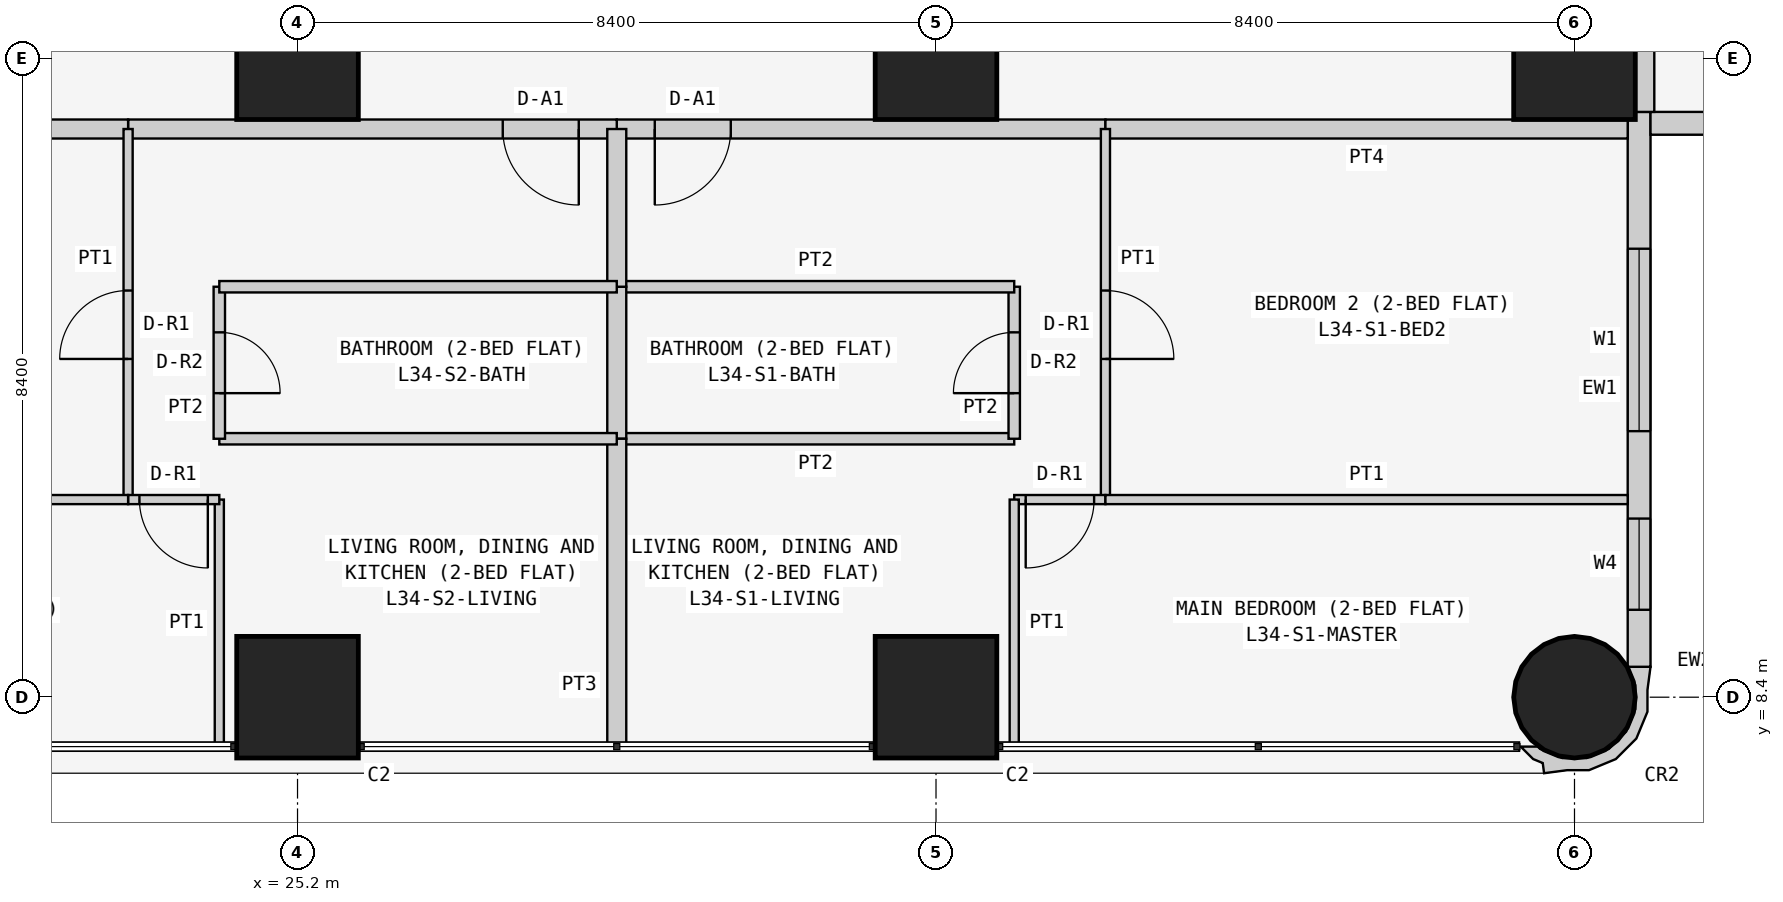
"""IFC4 building model, lengths in metres.
Left out: names, types, materials, properties, quantities, classifications, styles, units other than length and angle.
Written with IfcOpenShell. Run it as: python <this file> out.ifc"""

import sys

from ifc_helpers import new_model, si_unit, direction, frame, frame_2d, origin, origin_2d, place, context, subcontext, project, spatial, polyline, rectangle, circle, outline, extrude, element, fill, save


model = new_model("IFC4")
c1 = context("Model", 3, precision=1e-05, world=origin(), true_north=direction((0.0, 1.0)))
c2 = subcontext(c1, "Body", "Model", "MODEL_VIEW")
j1 = project(units=[si_unit("LENGTHUNIT", "METRE"), si_unit("PLANEANGLEUNIT", "RADIAN")], contexts=[c1])
p1 = place(None, origin())
s1 = spatial("IfcSite", under=j1, at=p1, CompositionType="ELEMENT")
p2 = place(p1, origin())
s2 = spatial("IfcBuilding", under=s1, at=p2, CompositionType="ELEMENT")
p3 = place(p2, frame((0.0, 0.0, 134.1)))
s3 = spatial("IfcBuildingStorey", under=s2, at=p3, CompositionType="ELEMENT", Elevation=134.1)
for number, where, z_axis, x_axis in (
    (1, (25.2, 8.4, 0.0), (0.0, 0.0, 1.0), (1.0, 0.0, 0.0)),
    (2, (25.2, 16.8, 0.0), (0.0, 0.0, 1.0), (1.0, 0.0, 0.0)),
    (3, (33.6, 8.4, 0.0), (0.0, 0.0, 1.0), (1.0, 0.0, 0.0)),
    (4, (33.6, 16.8, 0.0), (0.0, 0.0, 1.0), (1.0, 0.0, 0.0)),
):
    element("IfcColumn", number, at=place(p3, frame(where, z_axis=z_axis, x_axis=x_axis)), inside=s3, PredefinedType="COLUMN", context=c2, shape_type="SweptSolid", body=[
        extrude(rectangle(XDim=1.6, YDim=1.6, at=origin_2d()), origin(), (0.0, 0.0, 1.0), 3.6),
    ])
p4 = place(p3, frame((42.0, 8.4, 0.0), z_axis=(0.0, 0.0, 1.0), x_axis=(1.0, 0.0, 0.0)))
e5 = element("IfcColumn", 5, at=p4, inside=s3, PredefinedType="COLUMN", context=c2, shape_type="SweptSolid", body=[
    extrude(circle(Radius=0.8, at=origin_2d()), origin(), (0.0, 0.0, 1.0), 3.6),
])
p5 = place(p3, frame((42.0, 16.8, 0.0), z_axis=(0.0, 0.0, 1.0), x_axis=(1.0, 0.0, 0.0)))
e6 = element("IfcColumn", 6, at=p5, inside=s3, PredefinedType="COLUMN", context=c2, shape_type="SweptSolid", body=[
    extrude(rectangle(XDim=1.6, YDim=1.6, at=origin_2d()), origin(), (0.0, 0.0, 1.0), 3.6),
])
p6 = place(p3, frame((42.85, 8.8, 0.0), z_axis=(0.0, 0.0, 1.0), x_axis=(0.0, 1.0, 0.0)))
e7 = element("IfcWall", 7, at=p6, inside=s3, PredefinedType="SOLIDWALL", context=c2, shape_type="SweptSolid", body=[
    extrude(rectangle(XDim=7.3, YDim=0.3, at=frame_2d((3.65, 0.0))), origin(), (0.0, 0.0, 1.0), 3.45),
])
p7 = place(p6, frame((3.1, 0.0, 0.9)))
e8 = element("IfcOpeningElement", 8, at=p7, cuts=e7, PredefinedType="OPENING", context=c2, shape_type="SweptSolid", body=[
    extrude(rectangle(XDim=2.4, YDim=1.5, at=frame_2d((1.2, 0.75))), frame((0.0, 0.16, 0.0), z_axis=(0.0, -1.0, 0.0), x_axis=(1.0, 0.0, 0.0)), (0.0, 0.0, 1.0), 0.32),
])
p8 = place(p6, frame((0.75, 0.0, 0.9)))
e9 = element("IfcOpeningElement", 9, at=p8, cuts=e7, PredefinedType="OPENING", context=c2, shape_type="SweptSolid", body=[
    extrude(rectangle(XDim=1.2, YDim=1.5, at=frame_2d((0.6, 0.75))), frame((0.0, 0.16, 0.0), z_axis=(0.0, -1.0, 0.0), x_axis=(1.0, 0.0, 0.0)), (0.0, 0.0, 1.0), 0.32),
])
p9 = place(p3, frame((43.0, 15.95, 0.0), z_axis=(0.0, 0.0, 1.0), x_axis=(1.0, 0.0, 0.0)))
e10 = element("IfcWall", 10, at=p9, inside=s3, PredefinedType="SOLIDWALL", context=c2, shape_type="SweptSolid", body=[
    extrude(rectangle(XDim=15.4, YDim=0.3, at=frame_2d((7.7, 0.0))), origin(), (0.0, 0.0, 1.0), 3.45),
])
p10 = place(p9, frame((1.2, 0.0, 0.9)))
e11 = element("IfcOpeningElement", 11, at=p10, cuts=e10, PredefinedType="OPENING", context=c2, shape_type="SweptSolid", body=[
    extrude(rectangle(XDim=1.8, YDim=1.5, at=frame_2d((0.9, 0.75))), frame((0.0, 0.16, 0.0), z_axis=(0.0, -1.0, 0.0), x_axis=(1.0, 0.0, 0.0)), (0.0, 0.0, 1.0), 0.32),
])
p11 = place(p9, frame((4.95, 0.0, 1.5)))
e12 = element("IfcOpeningElement", 12, at=p11, cuts=e10, PredefinedType="OPENING", context=c2, shape_type="SweptSolid", body=[
    extrude(rectangle(XDim=0.9, YDim=0.7, at=frame_2d((0.45, 0.35))), frame((0.0, 0.16, 0.0), z_axis=(0.0, -1.0, 0.0), x_axis=(1.0, 0.0, 0.0)), (0.0, 0.0, 1.0), 0.32),
])
p12 = place(p9, frame((8.5, 0.0, 0.9)))
e13 = element("IfcOpeningElement", 13, at=p12, cuts=e10, PredefinedType="OPENING", context=c2, shape_type="SweptSolid", body=[
    extrude(rectangle(XDim=1.8, YDim=1.5, at=frame_2d((0.9, 0.75))), frame((0.0, 0.16, 0.0), z_axis=(0.0, -1.0, 0.0), x_axis=(1.0, 0.0, 0.0)), (0.0, 0.0, 1.0), 0.32),
])
p13 = place(p9, frame((12.5, 0.0, 0.0)))
e14 = element("IfcOpeningElement", 14, at=p13, cuts=e10, PredefinedType="OPENING", context=c2, shape_type="SweptSolid", body=[
    extrude(rectangle(XDim=0.9, YDim=2.4, at=frame_2d((0.45, 1.2))), frame((0.0, 0.16, 0.0), z_axis=(0.0, -1.0, 0.0), x_axis=(1.0, 0.0, 0.0)), (0.0, 0.0, 1.0), 0.32),
])
p14 = place(p9, frame((13.5, 0.0, 0.9)))
e15 = element("IfcOpeningElement", 15, at=p14, cuts=e10, PredefinedType="OPENING", context=c2, shape_type="SweptSolid", body=[
    extrude(rectangle(XDim=1.2, YDim=1.5, at=frame_2d((0.6, 0.75))), frame((0.0, 0.16, 0.0), z_axis=(0.0, -1.0, 0.0), x_axis=(1.0, 0.0, 0.0)), (0.0, 0.0, 1.0), 0.32),
])
p15 = place(p3, frame((41.352, 7.805, 0.0), z_axis=(0.0, 0.0, 1.0), x_axis=(0.343276641956, -0.93923434088, 0.0)))
e16 = element("IfcWall", 16, at=p15, inside=s3, PredefinedType="SOLIDWALL", context=c2, shape_type="SweptSolid", body=[
    extrude(outline(polyline([(-0.369, 1.89), (-0.509, 1.621), (-0.49, 1.615), (-0.479, 1.609), (-0.211, 1.62), (0.088, 1.511), (0.323, 1.295), (0.457, 1.006), (0.47, 0.688), (0.361, 0.389), (0.145, 0.154), (0.108, 0.136), (0.031, -0.075), (0.241, 0.023), (0.333, 0.124), (0.465, 0.094), (0.532, 0.393), (0.631, 0.663), (0.614, 1.044), (0.453, 1.391), (0.172, 1.649), (-0.097, 1.748), (-0.369, 1.89)])), origin(), (0.0, 0.0, 1.0), 3.45),
])
p16 = place(p3, frame((42.925, 22.971, 0.0), z_axis=(0.0, 0.0, 1.0), x_axis=(0.0, -1.0, 0.0)))
e17 = element("IfcWall", 17, at=p16, inside=s3, PredefinedType="PARTITIONING", context=c2, shape_type="SweptSolid", body=[
    extrude(rectangle(XDim=6.871, YDim=0.25, at=frame_2d((3.436, 0.0))), origin(), (0.0, 0.0, 1.0), 3.45),
])
p17 = place(p3, frame((35.829, 15.875, 0.0), z_axis=(0.0, 0.0, 1.0), x_axis=(-1.0, 0.0, 0.0)))
e18 = element("IfcWall", 18, at=p17, inside=s3, PredefinedType="PARTITIONING", context=c2, shape_type="SweptSolid", body=[
    extrude(rectangle(XDim=6.429, YDim=0.25, at=frame_2d((3.215, 0.0))), origin(), (0.0, 0.0, 1.0), 3.45),
])
p18 = place(p17, frame((4.929, 0.0, 0.0)))
e19 = element("IfcOpeningElement", 19, at=p18, cuts=e18, PredefinedType="OPENING", context=c2, shape_type="SweptSolid", body=[
    extrude(rectangle(XDim=1.0, YDim=2.1, at=frame_2d((0.5, 1.05))), frame((0.0, 0.135, 0.0), z_axis=(0.0, -1.0, 0.0), x_axis=(1.0, 0.0, 0.0)), (0.0, 0.0, 1.0), 0.27),
])
p19 = place(p3, frame((42.7, 15.875, 0.0), z_axis=(0.0, 0.0, 1.0), x_axis=(-1.0, 0.0, 0.0)))
e20 = element("IfcWall", 20, at=p19, inside=s3, PredefinedType="PARTITIONING", context=c2, shape_type="SweptSolid", body=[
    extrude(rectangle(XDim=6.871, YDim=0.25, at=frame_2d((3.436, 0.0))), origin(), (0.0, 0.0, 1.0), 3.45),
])
p20 = place(p3, frame((29.4, 15.875, 0.0), z_axis=(0.0, 0.0, 1.0), x_axis=(-1.0, 0.0, 0.0)))
e21 = element("IfcWall", 21, at=p20, inside=s3, PredefinedType="PARTITIONING", context=c2, shape_type="SweptSolid", body=[
    extrude(rectangle(XDim=6.429, YDim=0.25, at=frame_2d((3.214, 0.0))), origin(), (0.0, 0.0, 1.0), 3.45),
])
p21 = place(p20, frame((0.5, 0.0, 0.0)))
e22 = element("IfcOpeningElement", 22, at=p21, cuts=e21, PredefinedType="OPENING", context=c2, shape_type="SweptSolid", body=[
    extrude(rectangle(XDim=1.0, YDim=2.1, at=frame_2d((0.5, 1.05))), frame((0.0, 0.135, 0.0), z_axis=(0.0, -1.0, 0.0), x_axis=(1.0, 0.0, 0.0)), (0.0, 0.0, 1.0), 0.27),
])
p22 = place(p3, frame((22.971, 15.875, 0.0), z_axis=(0.0, 0.0, 1.0), x_axis=(-1.0, 0.0, 0.0)))
e23 = element("IfcWall", 23, at=p22, inside=s3, PredefinedType="PARTITIONING", context=c2, shape_type="SweptSolid", body=[
    extrude(rectangle(XDim=6.871, YDim=0.25, at=frame_2d((3.436, 0.0))), origin(), (0.0, 0.0, 1.0), 3.45),
])
p23 = place(p3, frame((29.4, 11.8, 0.0), z_axis=(0.0, 0.0, 1.0), x_axis=(1.0, 0.0, 0.0)))
e24 = element("IfcWall", 24, at=p23, inside=s3, PredefinedType="PARTITIONING", context=c2, shape_type="SweptSolid", body=[
    extrude(rectangle(XDim=5.229, YDim=0.15, at=frame_2d((2.615, 0.0))), origin(), (0.0, 0.0, 1.0), 3.45),
])
p24 = place(p3, frame((34.629, 11.8, 0.0), z_axis=(0.0, 0.0, 1.0), x_axis=(0.0, 1.0, 0.0)))
e25 = element("IfcWall", 25, at=p24, inside=s3, PredefinedType="PARTITIONING", context=c2, shape_type="SweptSolid", body=[
    extrude(rectangle(XDim=2.0, YDim=0.15, at=frame_2d((1.0, 0.0))), origin(), (0.0, 0.0, 1.0), 3.45),
])
p25 = place(p24, frame((0.6, 0.0, 0.0)))
e26 = element("IfcOpeningElement", 26, at=p25, cuts=e25, PredefinedType="OPENING", context=c2, shape_type="SweptSolid", body=[
    extrude(rectangle(XDim=0.8, YDim=2.1, at=frame_2d((0.4, 1.05))), frame((0.0, 0.085, 0.0), z_axis=(0.0, -1.0, 0.0), x_axis=(1.0, 0.0, 0.0)), (0.0, 0.0, 1.0), 0.17),
])
p26 = place(p3, frame((34.629, 13.8, 0.0), z_axis=(0.0, 0.0, 1.0), x_axis=(-1.0, 0.0, 0.0)))
e27 = element("IfcWall", 27, at=p26, inside=s3, PredefinedType="PARTITIONING", context=c2, shape_type="SweptSolid", body=[
    extrude(rectangle(XDim=5.229, YDim=0.15, at=frame_2d((2.615, 0.0))), origin(), (0.0, 0.0, 1.0), 3.45),
])
p27 = place(p3, frame((29.4, 13.8, 0.0), z_axis=(0.0, 0.0, 1.0), x_axis=(0.0, -1.0, 0.0)))
e28 = element("IfcWall", 28, at=p27, inside=s3, PredefinedType="PARTITIONING", context=c2, shape_type="SweptSolid", body=[
    extrude(rectangle(XDim=2.0, YDim=0.25, at=frame_2d((1.0, 0.0))), origin(), (0.0, 0.0, 1.0), 2.848),
])
p28 = place(p3, frame((35.829, 15.875, 0.0), z_axis=(0.0, 0.0, 1.0), x_axis=(0.0, -1.0, 0.0)))
e29 = element("IfcWall", 29, at=p28, inside=s3, PredefinedType="PARTITIONING", context=c2, shape_type="SweptSolid", body=[
    extrude(rectangle(XDim=4.875, YDim=0.12, at=frame_2d((2.438, 0.0))), origin(), (0.0, 0.0, 1.0), 3.45),
])
p29 = place(p28, frame((2.125, 0.0, 0.0)))
e30 = element("IfcOpeningElement", 30, at=p29, cuts=e29, PredefinedType="OPENING", context=c2, shape_type="SweptSolid", body=[
    extrude(rectangle(XDim=0.9, YDim=2.1, at=frame_2d((0.45, 1.05))), frame((0.0, 0.07, 0.0), z_axis=(0.0, -1.0, 0.0), x_axis=(1.0, 0.0, 0.0)), (0.0, 0.0, 1.0), 0.14),
])
p30 = place(p3, frame((35.829, 11.0, 0.0), z_axis=(0.0, 0.0, 1.0), x_axis=(-1.0, 0.0, 0.0)))
e31 = element("IfcWall", 31, at=p30, inside=s3, PredefinedType="PARTITIONING", context=c2, shape_type="SweptSolid", body=[
    extrude(rectangle(XDim=1.2, YDim=0.12, at=frame_2d((0.6, 0.0))), origin(), (0.0, 0.0, 1.0), 3.45),
])
p31 = place(p30, frame((0.149, 0.0, 0.0)))
e32 = element("IfcOpeningElement", 32, at=p31, cuts=e31, PredefinedType="OPENING", context=c2, shape_type="SweptSolid", body=[
    extrude(rectangle(XDim=0.9, YDim=2.1, at=frame_2d((0.45, 1.05))), frame((0.0, 0.07, 0.0), z_axis=(0.0, -1.0, 0.0), x_axis=(1.0, 0.0, 0.0)), (0.0, 0.0, 1.0), 0.14),
])
p32 = place(p3, frame((34.629, 11.0, 0.0), z_axis=(0.0, 0.0, 1.0), x_axis=(0.0, -1.0, 0.0)))
e33 = element("IfcWall", 33, at=p32, inside=s3, PredefinedType="PARTITIONING", context=c2, shape_type="SweptSolid", body=[
    extrude(rectangle(XDim=3.25, YDim=0.12, at=frame_2d((1.625, 0.0))), origin(), (0.0, 0.0, 1.0), 3.45),
])
p33 = place(p3, frame((29.4, 7.75, 0.0), z_axis=(0.0, 0.0, 1.0), x_axis=(0.0, 1.0, 0.0)))
e34 = element("IfcWall", 34, at=p33, inside=s3, PredefinedType="PARTITIONING", context=c2, shape_type="SweptSolid", body=[
    extrude(rectangle(XDim=4.05, YDim=0.25, at=frame_2d((2.025, 0.0))), origin(), (0.0, 0.0, 1.0), 2.848),
])
p34 = place(p3, frame((29.4, 13.8, 0.0), z_axis=(0.0, 0.0, 1.0), x_axis=(0.0, 1.0, 0.0)))
e35 = element("IfcWall", 35, at=p34, inside=s3, PredefinedType="PARTITIONING", context=c2, shape_type="SweptSolid", body=[
    extrude(rectangle(XDim=2.075, YDim=0.25, at=frame_2d((1.038, 0.0))), origin(), (0.0, 0.0, 1.0), 2.848),
])
p35 = place(p3, frame((35.829, 11.0, 0.0), z_axis=(0.0, 0.0, 1.0), x_axis=(1.0, 0.0, 0.0)))
e36 = element("IfcWall", 36, at=p35, inside=s3, PredefinedType="PARTITIONING", context=c2, shape_type="SweptSolid", body=[
    extrude(rectangle(XDim=6.871, YDim=0.12, at=frame_2d((3.436, 0.0))), origin(), (0.0, 0.0, 1.0), 3.45),
])
p36 = place(p3, frame((29.4, 11.8, 0.0), z_axis=(0.0, 0.0, 1.0), x_axis=(-1.0, 0.0, 0.0)))
e37 = element("IfcWall", 37, at=p36, inside=s3, PredefinedType="PARTITIONING", context=c2, shape_type="SweptSolid", body=[
    extrude(rectangle(XDim=5.229, YDim=0.15, at=frame_2d((2.615, 0.0))), origin(), (0.0, 0.0, 1.0), 3.45),
])
p37 = place(p3, frame((24.171, 11.8, 0.0), z_axis=(0.0, 0.0, 1.0), x_axis=(0.0, 1.0, 0.0)))
e38 = element("IfcWall", 38, at=p37, inside=s3, PredefinedType="PARTITIONING", context=c2, shape_type="SweptSolid", body=[
    extrude(rectangle(XDim=2.0, YDim=0.15, at=frame_2d((1.0, 0.0))), origin(), (0.0, 0.0, 1.0), 3.45),
])
p38 = place(p37, frame((0.6, 0.0, 0.0)))
e39 = element("IfcOpeningElement", 39, at=p38, cuts=e38, PredefinedType="OPENING", context=c2, shape_type="SweptSolid", body=[
    extrude(rectangle(XDim=0.8, YDim=2.1, at=frame_2d((0.4, 1.05))), frame((0.0, 0.085, 0.0), z_axis=(0.0, -1.0, 0.0), x_axis=(1.0, 0.0, 0.0)), (0.0, 0.0, 1.0), 0.17),
])
p39 = place(p3, frame((24.171, 13.8, 0.0), z_axis=(0.0, 0.0, 1.0), x_axis=(1.0, 0.0, 0.0)))
e40 = element("IfcWall", 40, at=p39, inside=s3, PredefinedType="PARTITIONING", context=c2, shape_type="SweptSolid", body=[
    extrude(rectangle(XDim=5.229, YDim=0.15, at=frame_2d((2.615, 0.0))), origin(), (0.0, 0.0, 1.0), 3.45),
])
p40 = place(p3, frame((22.971, 11.0, 0.0), z_axis=(0.0, 0.0, 1.0), x_axis=(0.0, 1.0, 0.0)))
e41 = element("IfcWall", 41, at=p40, inside=s3, PredefinedType="PARTITIONING", context=c2, shape_type="SweptSolid", body=[
    extrude(rectangle(XDim=4.875, YDim=0.12, at=frame_2d((2.438, 0.0))), origin(), (0.0, 0.0, 1.0), 3.45),
])
p41 = place(p40, frame((1.85, 0.0, 0.0)))
e42 = element("IfcOpeningElement", 42, at=p41, cuts=e41, PredefinedType="OPENING", context=c2, shape_type="SweptSolid", body=[
    extrude(rectangle(XDim=0.9, YDim=2.1, at=frame_2d((0.45, 1.05))), frame((0.0, 0.07, 0.0), z_axis=(0.0, -1.0, 0.0), x_axis=(1.0, 0.0, 0.0)), (0.0, 0.0, 1.0), 0.14),
])
p42 = place(p3, frame((24.171, 7.75, 0.0), z_axis=(0.0, 0.0, 1.0), x_axis=(0.0, 1.0, 0.0)))
e43 = element("IfcWall", 43, at=p42, inside=s3, PredefinedType="PARTITIONING", context=c2, shape_type="SweptSolid", body=[
    extrude(rectangle(XDim=3.25, YDim=0.12, at=frame_2d((1.625, 0.0))), origin(), (0.0, 0.0, 1.0), 3.45),
])
p43 = place(p3, frame((24.171, 11.0, 0.0), z_axis=(0.0, 0.0, 1.0), x_axis=(-1.0, 0.0, 0.0)))
e44 = element("IfcWall", 44, at=p43, inside=s3, PredefinedType="PARTITIONING", context=c2, shape_type="SweptSolid", body=[
    extrude(rectangle(XDim=1.2, YDim=0.12, at=frame_2d((0.6, 0.0))), origin(), (0.0, 0.0, 1.0), 3.45),
])
p44 = place(p43, frame((0.151, 0.0, 0.0)))
e45 = element("IfcOpeningElement", 45, at=p44, cuts=e44, PredefinedType="OPENING", context=c2, shape_type="SweptSolid", body=[
    extrude(rectangle(XDim=0.9, YDim=2.1, at=frame_2d((0.45, 1.05))), frame((0.0, 0.07, 0.0), z_axis=(0.0, -1.0, 0.0), x_axis=(1.0, 0.0, 0.0)), (0.0, 0.0, 1.0), 0.14),
])
p45 = place(p3, frame((22.971, 11.0, 0.0), z_axis=(0.0, 0.0, 1.0), x_axis=(-1.0, 0.0, 0.0)))
e46 = element("IfcWall", 46, at=p45, inside=s3, PredefinedType="PARTITIONING", context=c2, shape_type="SweptSolid", body=[
    extrude(rectangle(XDim=6.871, YDim=0.12, at=frame_2d((3.436, 0.0))), origin(), (0.0, 0.0, 1.0), 3.45),
])
p46 = place(p7, origin())
e47 = element("IfcWindow", 47, at=p46, inside=s3, PartitioningType="SINGLE_PANEL", PredefinedType="WINDOW", context=c2, shape_type="SweptSolid", body=[
    extrude(rectangle(XDim=2.4, YDim=1.5, at=frame_2d((1.2, 0.75))), frame((0.0, 0.03, 0.0), z_axis=(0.0, -1.0, 0.0), x_axis=(1.0, 0.0, 0.0)), (0.0, 0.0, 1.0), 0.06),
])
fill(e8, e47)
p47 = place(p8, origin())
e48 = element("IfcWindow", 48, at=p47, inside=s3, PartitioningType="SINGLE_PANEL", PredefinedType="WINDOW", context=c2, shape_type="SweptSolid", body=[
    extrude(rectangle(XDim=1.2, YDim=1.5, at=frame_2d((0.6, 0.75))), frame((0.0, 0.03, 0.0), z_axis=(0.0, -1.0, 0.0), x_axis=(1.0, 0.0, 0.0)), (0.0, 0.0, 1.0), 0.06),
])
fill(e9, e48)
p48 = place(p18, origin())
e49 = element("IfcDoor", 49, at=p48, inside=s3, OperationType="SINGLE_SWING_RIGHT", PredefinedType="DOOR", context=c2, shape_type="SweptSolid", body=[
    extrude(rectangle(XDim=1.0, YDim=2.1, at=frame_2d((0.5, 1.05))), frame((0.0, 0.025, 0.0), z_axis=(0.0, -1.0, 0.0), x_axis=(1.0, 0.0, 0.0)), (0.0, 0.0, 1.0), 0.05),
])
fill(e19, e49)
p49 = place(p25, origin())
e50 = element("IfcDoor", 50, at=p49, inside=s3, OperationType="SINGLE_SWING_LEFT", PredefinedType="DOOR", context=c2, shape_type="SweptSolid", body=[
    extrude(rectangle(XDim=0.8, YDim=2.1, at=frame_2d((0.4, 1.05))), frame((0.0, 0.025, 0.0), z_axis=(0.0, -1.0, 0.0), x_axis=(1.0, 0.0, 0.0)), (0.0, 0.0, 1.0), 0.05),
])
fill(e26, e50)
p50 = place(p29, origin())
e51 = element("IfcDoor", 51, at=p50, inside=s3, OperationType="SINGLE_SWING_RIGHT", PredefinedType="DOOR", context=c2, shape_type="SweptSolid", body=[
    extrude(rectangle(XDim=0.9, YDim=2.1, at=frame_2d((0.45, 1.05))), frame((0.0, 0.025, 0.0), z_axis=(0.0, -1.0, 0.0), x_axis=(1.0, 0.0, 0.0)), (0.0, 0.0, 1.0), 0.05),
])
fill(e30, e51)
p51 = place(p31, origin())
e52 = element("IfcDoor", 52, at=p51, inside=s3, OperationType="SINGLE_SWING_RIGHT", PredefinedType="DOOR", context=c2, shape_type="SweptSolid", body=[
    extrude(rectangle(XDim=0.9, YDim=2.1, at=frame_2d((0.45, 1.05))), frame((0.0, 0.025, 0.0), z_axis=(0.0, -1.0, 0.0), x_axis=(1.0, 0.0, 0.0)), (0.0, 0.0, 1.0), 0.05),
])
fill(e32, e52)
p52 = place(p21, origin())
e53 = element("IfcDoor", 53, at=p52, inside=s3, OperationType="SINGLE_SWING_LEFT", PredefinedType="DOOR", context=c2, shape_type="SweptSolid", body=[
    extrude(rectangle(XDim=1.0, YDim=2.1, at=frame_2d((0.5, 1.05))), frame((0.0, 0.025, 0.0), z_axis=(0.0, -1.0, 0.0), x_axis=(1.0, 0.0, 0.0)), (0.0, 0.0, 1.0), 0.05),
])
fill(e22, e53)
p53 = place(p38, frame((0.8, 0.0, 0.0), z_axis=(0.0, 0.0, 1.0), x_axis=(-1.0, 0.0, 0.0)))
e54 = element("IfcDoor", 54, at=p53, inside=s3, OperationType="SINGLE_SWING_RIGHT", PredefinedType="DOOR", context=c2, shape_type="SweptSolid", body=[
    extrude(rectangle(XDim=0.8, YDim=2.1, at=frame_2d((0.4, 1.05))), frame((0.0, 0.025, 0.0), z_axis=(0.0, -1.0, 0.0), x_axis=(1.0, 0.0, 0.0)), (0.0, 0.0, 1.0), 0.05),
])
fill(e39, e54)
p54 = place(p41, origin())
e55 = element("IfcDoor", 55, at=p54, inside=s3, OperationType="SINGLE_SWING_LEFT", PredefinedType="DOOR", context=c2, shape_type="SweptSolid", body=[
    extrude(rectangle(XDim=0.9, YDim=2.1, at=frame_2d((0.45, 1.05))), frame((0.0, 0.025, 0.0), z_axis=(0.0, -1.0, 0.0), x_axis=(1.0, 0.0, 0.0)), (0.0, 0.0, 1.0), 0.05),
])
fill(e42, e55)
p55 = place(p44, origin())
e56 = element("IfcDoor", 56, at=p55, inside=s3, OperationType="SINGLE_SWING_LEFT", PredefinedType="DOOR", context=c2, shape_type="SweptSolid", body=[
    extrude(rectangle(XDim=0.9, YDim=2.1, at=frame_2d((0.45, 1.05))), frame((0.0, 0.025, 0.0), z_axis=(0.0, -1.0, 0.0), x_axis=(1.0, 0.0, 0.0)), (0.0, 0.0, 1.0), 0.05),
])
fill(e45, e56)
save(model, sys.argv[1])
